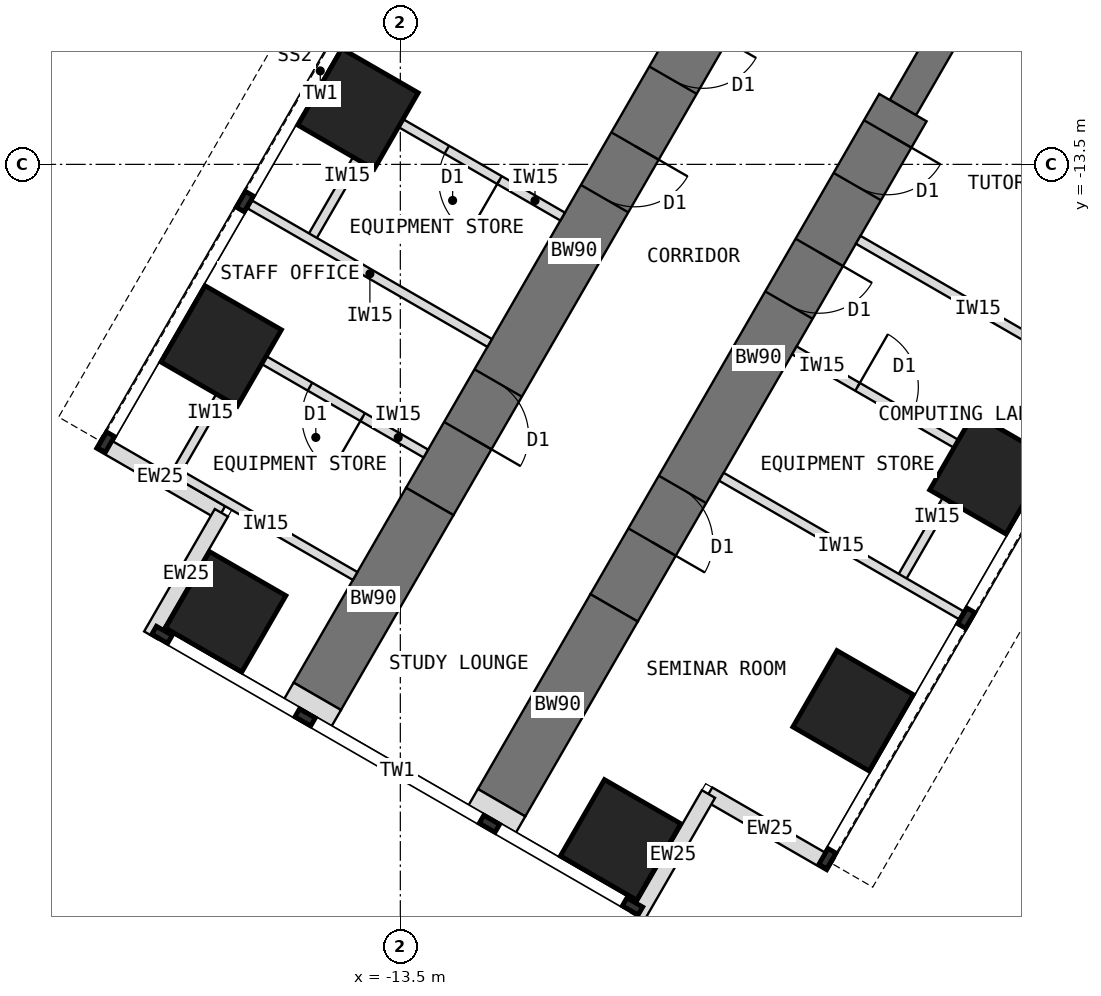
"""IFC4 building model, lengths in metres.
Left out: names, types, materials, properties, quantities, classifications, styles, units other than length and angle.
Written with IfcOpenShell. Run it as: python <this file> out.ifc"""

import sys

from ifc_helpers import new_model, si_unit, direction, frame, frame_2d, origin, origin_2d, place, context, subcontext, project, spatial, rectangle, extrude, element, fill, save


model = new_model("IFC4")
c1 = context("Model", 3, precision=1e-05, world=origin(), true_north=direction((0.0, 1.0)))
c2 = subcontext(c1, "Body", "Model", "MODEL_VIEW")
j1 = project(units=[si_unit("LENGTHUNIT", "METRE"), si_unit("PLANEANGLEUNIT", "RADIAN")], contexts=[c1])
p1 = place(None, origin())
s1 = spatial("IfcSite", under=j1, at=p1, CompositionType="ELEMENT")
p2 = place(p1, origin())
s2 = spatial("IfcBuilding", under=s1, at=p2, CompositionType="ELEMENT")
p3 = place(p2, frame((0.0, 0.0, 60.5)))
s3 = spatial("IfcBuildingStorey", under=s2, at=p3, CompositionType="ELEMENT", Elevation=60.5)
p4 = place(p3, frame((-3.939, -10.322, 0.0), z_axis=(0.0, 0.0, 1.0), x_axis=(0.866011268655, -0.500024481964, 0.0)))
e1 = element("IfcWall", 1, at=p4, inside=s3, PredefinedType="SHEAR", context=c2, shape_type="SweptSolid", body=[
    extrude(rectangle(XDim=4.548, YDim=0.7, at=frame_2d((2.274, 0.0))), origin(), (0.0, 0.0, 1.0), 4.0),
])
p5 = place(p3, frame((-3.939, -10.322, 0.0), z_axis=(0.0, 0.0, 1.0), x_axis=(-0.499918158782, -0.866072649678, 0.0)))
e2 = element("IfcWall", 2, at=p5, inside=s3, PredefinedType="SHEAR", context=c2, shape_type="SweptSolid", body=[
    extrude(rectangle(XDim=2.592, YDim=0.5, at=frame_2d((1.296, 0.0))), origin(), (0.0, 0.0, 1.0), 4.0),
])
p6 = place(p3, frame((-5.234, -12.566, 0.0), z_axis=(0.0, 0.0, 1.0), x_axis=(-0.499997557548, -0.86602681393, 0.0)))
e3 = element("IfcWall", 3, at=p6, inside=s3, PredefinedType="SHEAR", context=c2, shape_type="SweptSolid", body=[
    extrude(rectangle(XDim=9.5, YDim=0.9, at=frame_2d((4.75, 0.0))), origin(), (0.0, 0.0, 1.0), 4.0),
])
p7 = place(p6, frame((0.5, 0.0, 0.0)))
e4 = element("IfcOpeningElement", 4, at=p7, cuts=e3, PredefinedType="OPENING", context=c2, shape_type="SweptSolid", body=[
    extrude(rectangle(XDim=1.0, YDim=2.1, at=frame_2d((0.5, 1.05))), frame((0.0, 0.46, 0.0), z_axis=(0.0, -1.0, 0.0), x_axis=(1.0, 0.0, 0.0)), (0.0, 0.0, 1.0), 0.92),
])
p8 = place(p6, frame((2.75, 0.0, 0.0)))
e5 = element("IfcOpeningElement", 5, at=p8, cuts=e3, PredefinedType="OPENING", context=c2, shape_type="SweptSolid", body=[
    extrude(rectangle(XDim=1.0, YDim=2.1, at=frame_2d((0.5, 1.05))), frame((0.0, 0.46, 0.0), z_axis=(0.0, -1.0, 0.0), x_axis=(1.0, 0.0, 0.0)), (0.0, 0.0, 1.0), 0.92),
])
p9 = place(p6, frame((7.25, 0.0, 0.0)))
e6 = element("IfcOpeningElement", 6, at=p9, cuts=e3, PredefinedType="OPENING", context=c2, shape_type="SweptSolid", body=[
    extrude(rectangle(XDim=1.0, YDim=2.1, at=frame_2d((0.5, 1.05))), frame((0.0, 0.46, 0.0), z_axis=(0.0, -1.0, 0.0), x_axis=(1.0, 0.0, 0.0)), (0.0, 0.0, 1.0), 0.92),
])
p10 = place(p3, frame((-9.984, -20.794, 0.0), z_axis=(0.0, 0.0, 1.0), x_axis=(-0.500042316284, -0.866000971088, 0.0)))
e7 = element("IfcWall", 7, at=p10, inside=s3, PredefinedType="SHEAR", context=c2, shape_type="SweptSolid", body=[
    extrude(rectangle(XDim=3.7, YDim=0.9, at=frame_2d((1.85, 0.0))), origin(), (0.0, 0.0, 1.0), 4.0),
])
p11 = place(p3, frame((-8.266, -10.816, 0.0), z_axis=(0.0, 0.0, 1.0), x_axis=(-0.499997557548, -0.86602681393, 0.0)))
e8 = element("IfcWall", 8, at=p11, inside=s3, PredefinedType="SHEAR", context=c2, shape_type="SweptSolid", body=[
    extrude(rectangle(XDim=9.5, YDim=0.9, at=frame_2d((4.75, 0.0))), origin(), (0.0, 0.0, 1.0), 4.0),
])
p12 = place(p11, frame((0.5, 0.0, 0.0)))
e9 = element("IfcOpeningElement", 9, at=p12, cuts=e8, PredefinedType="OPENING", context=c2, shape_type="SweptSolid", body=[
    extrude(rectangle(XDim=1.0, YDim=2.1, at=frame_2d((0.5, 1.05))), frame((0.0, 0.46, 0.0), z_axis=(0.0, -1.0, 0.0), x_axis=(1.0, 0.0, 0.0)), (0.0, 0.0, 1.0), 0.92),
])
p13 = place(p11, frame((2.75, 0.0, 0.0)))
e10 = element("IfcOpeningElement", 10, at=p13, cuts=e8, PredefinedType="OPENING", context=c2, shape_type="SweptSolid", body=[
    extrude(rectangle(XDim=1.0, YDim=2.1, at=frame_2d((0.5, 1.05))), frame((0.0, 0.46, 0.0), z_axis=(0.0, -1.0, 0.0), x_axis=(1.0, 0.0, 0.0)), (0.0, 0.0, 1.0), 0.92),
])
p14 = place(p11, frame((7.25, 0.0, 0.0)))
e11 = element("IfcOpeningElement", 11, at=p14, cuts=e8, PredefinedType="OPENING", context=c2, shape_type="SweptSolid", body=[
    extrude(rectangle(XDim=1.0, YDim=2.1, at=frame_2d((0.5, 1.05))), frame((0.0, 0.46, 0.0), z_axis=(0.0, -1.0, 0.0), x_axis=(1.0, 0.0, 0.0)), (0.0, 0.0, 1.0), 0.92),
])
p15 = place(p3, frame((-13.016, -19.044, 0.0), z_axis=(0.0, 0.0, 1.0), x_axis=(-0.499992827086, -0.866029545028, 0.0)))
e12 = element("IfcWall", 12, at=p15, inside=s3, PredefinedType="SHEAR", context=c2, shape_type="SweptSolid", body=[
    extrude(rectangle(XDim=3.7, YDim=0.9, at=frame_2d((1.85, 0.0))), origin(), (0.0, 0.0, 1.0), 4.0),
])
for number, where, z_axis, x_axis in (
    (13, (-3.804, -18.588, 0.0), (0.0, 0.0, 1.0), (0.5, 0.866, 0.0)),
    (14, (-14.196, -12.588, 0.0), (0.0, 0.0, 1.0), (0.5, 0.866, 0.0)),
    (15, (-6.054, -22.486, 0.0), (0.0, 0.0, 1.0), (0.5, 0.866, 0.0)),
    (16, (-16.446, -16.486, 0.0), (0.0, 0.0, 1.0), (0.5, 0.866, 0.0)),
    (17, (-9.877, -24.608, 0.0), (0.0, 0.0, 1.0), (0.5, 0.866, 0.0)),
    (18, (-16.373, -20.858, 0.0), (0.0, 0.0, 1.0), (0.5, 0.866, 0.0)),
):
    element("IfcColumn", number, at=place(p3, frame(where, z_axis=z_axis, x_axis=x_axis)), inside=s3, PredefinedType="COLUMN", context=c2, shape_type="SweptSolid", body=[
        extrude(rectangle(XDim=1.45, YDim=1.45, at=origin_2d()), origin(), (0.0, 0.0, 1.0), 4.0),
    ])
for number, where, z_axis, x_axis in (
    (19, (-6.419, -25.017, 0.0), (0.0, 0.0, 1.0), (-0.866, 0.5, 0.0)),
    (20, (-8.432, -23.855, 0.0), (0.0, 0.0, 1.0), (-0.5, -0.866, 0.0)),
    (21, (-18.456, -18.067, 0.0), (0.0, 0.0, 1.0), (0.866, -0.5, 0.0)),
    (22, (-16.443, -19.23, 0.0), (0.0, 0.0, 1.0), (-0.5, -0.866, 0.0)),
):
    element("IfcWall", number, at=place(p3, frame(where, z_axis=z_axis, x_axis=x_axis)), inside=s3, PredefinedType="STANDARD", context=c2, shape_type="SweptSolid", body=[
        extrude(rectangle(XDim=2.325, YDim=0.25, at=frame_2d((1.163, 0.0))), origin(), (0.0, 0.0, 1.0), 3.8),
    ])
for number, where, z_axis, x_axis in (
    (23, (-11.834, -23.998, 0.0), (0.0, 0.0, 1.0), (-0.5, -0.866, 0.0)),
    (24, (-14.865, -22.248, 0.0), (0.0, 0.0, 1.0), (-0.5, -0.866, 0.0)),
):
    element("IfcWall", number, at=place(p3, frame(where, z_axis=z_axis, x_axis=x_axis)), inside=s3, PredefinedType="PARTITIONING", context=c2, shape_type="SweptSolid", body=[
        extrude(rectangle(XDim=0.31, YDim=0.9, at=frame_2d((0.155, 0.0))), origin(), (0.0, 0.0, 1.0), 3.8),
    ])
for number, where, z_axis, x_axis in (
    (25, (-5.97, -14.74, 0.0), (0.0, 0.0, 1.0), (0.866, -0.5, 0.0)),
    (26, (-8.22, -18.637, 0.0), (0.0, 0.0, 1.0), (0.866, -0.5, 0.0)),
):
    element("IfcWall", number, at=place(p3, frame(where, z_axis=z_axis, x_axis=x_axis)), inside=s3, PredefinedType="PARTITIONING", context=c2, shape_type="SweptSolid", body=[
        extrude(rectangle(XDim=4.55, YDim=0.15, at=frame_2d((2.275, 0.0))), origin(), (0.0, 0.0, 1.0), 3.8),
    ])
p16 = place(p3, frame((-4.075, -18.259, 0.0), z_axis=(0.0, 0.0, 1.0), x_axis=(-0.500001309137, -0.866024647952, 0.0)))
e27 = element("IfcWall", 27, at=p16, inside=s3, PredefinedType="PARTITIONING", context=c2, shape_type="SweptSolid", body=[
    extrude(rectangle(XDim=2.4, YDim=0.15, at=frame_2d((1.2, 0.0))), origin(), (0.0, 0.0, 1.0), 3.8),
])
p17 = place(p3, frame((-7.02, -16.559, 0.0), z_axis=(0.0, 0.0, 1.0), x_axis=(0.866038511948, -0.499977295307, 0.0)))
e28 = element("IfcWall", 28, at=p17, inside=s3, PredefinedType="PARTITIONING", context=c2, shape_type="SweptSolid", body=[
    extrude(rectangle(XDim=3.4, YDim=0.15, at=frame_2d((1.7, 0.0))), origin(), (0.0, 0.0, 1.0), 3.8),
])
p18 = place(p17, frame((1.2, 0.0, 0.0)))
e29 = element("IfcOpeningElement", 29, at=p18, cuts=e28, PredefinedType="OPENING", context=c2, shape_type="SweptSolid", body=[
    extrude(rectangle(XDim=1.0, YDim=2.1, at=frame_2d((0.5, 1.05))), frame((0.0, 0.085, 0.0), z_axis=(0.0, -1.0, 0.0), x_axis=(1.0, 0.0, 0.0)), (0.0, 0.0, 1.0), 0.17),
])
p19 = place(p3, frame((-12.03, -16.437, 0.0), z_axis=(0.0, 0.0, 1.0), x_axis=(-0.866035472144, 0.499982560684, 0.0)))
e30 = element("IfcWall", 30, at=p19, inside=s3, PredefinedType="PARTITIONING", context=c2, shape_type="SweptSolid", body=[
    extrude(rectangle(XDim=4.55, YDim=0.15, at=frame_2d((2.275, 0.0))), origin(), (0.0, 0.0, 1.0), 3.8),
])
p20 = place(p3, frame((-13.775, -12.658, 0.0), z_axis=(0.0, 0.0, 1.0), x_axis=(-0.500033551112, -0.866006032174, 0.0)))
e31 = element("IfcWall", 31, at=p20, inside=s3, PredefinedType="PARTITIONING", context=c2, shape_type="SweptSolid", body=[
    extrude(rectangle(XDim=2.4, YDim=0.15, at=frame_2d((1.2, 0.0))), origin(), (0.0, 0.0, 1.0), 3.8),
])
p21 = place(p3, frame((-10.83, -14.359, 0.0), z_axis=(0.0, 0.0, 1.0), x_axis=(-0.865989465428, 0.500062241894, 0.0)))
e32 = element("IfcWall", 32, at=p21, inside=s3, PredefinedType="PARTITIONING", context=c2, shape_type="SweptSolid", body=[
    extrude(rectangle(XDim=3.4, YDim=0.15, at=frame_2d((1.7, 0.0))), origin(), (0.0, 0.0, 1.0), 3.8),
])
p22 = place(p21, frame((1.2, 0.0, 0.0)))
e33 = element("IfcOpeningElement", 33, at=p22, cuts=e32, PredefinedType="OPENING", context=c2, shape_type="SweptSolid", body=[
    extrude(rectangle(XDim=1.0, YDim=2.1, at=frame_2d((0.5, 1.05))), frame((0.0, 0.085, 0.0), z_axis=(0.0, -1.0, 0.0), x_axis=(1.0, 0.0, 0.0)), (0.0, 0.0, 1.0), 0.17),
])
p23 = place(p3, frame((-16.025, -16.556, 0.0), z_axis=(0.0, 0.0, 1.0), x_axis=(-0.500077600433, -0.865980596518, 0.0)))
e34 = element("IfcWall", 34, at=p23, inside=s3, PredefinedType="PARTITIONING", context=c2, shape_type="SweptSolid", body=[
    extrude(rectangle(XDim=2.4, YDim=0.15, at=frame_2d((1.2, 0.0))), origin(), (0.0, 0.0, 1.0), 3.8),
])
p24 = place(p3, frame((-13.08, -18.256, 0.0), z_axis=(0.0, 0.0, 1.0), x_axis=(-0.866020560687, 0.500008388397, 0.0)))
e35 = element("IfcWall", 35, at=p24, inside=s3, PredefinedType="PARTITIONING", context=c2, shape_type="SweptSolid", body=[
    extrude(rectangle(XDim=3.4, YDim=0.15, at=frame_2d((1.7, 0.0))), origin(), (0.0, 0.0, 1.0), 3.8),
])
p25 = place(p24, frame((1.2, 0.0, 0.0)))
e36 = element("IfcOpeningElement", 36, at=p25, cuts=e35, PredefinedType="OPENING", context=c2, shape_type="SweptSolid", body=[
    extrude(rectangle(XDim=1.0, YDim=2.1, at=frame_2d((0.5, 1.05))), frame((0.0, 0.085, 0.0), z_axis=(0.0, -1.0, 0.0), x_axis=(1.0, 0.0, 0.0)), (0.0, 0.0, 1.0), 0.17),
])
p26 = place(p3, frame((-14.243, -20.269, 0.0), z_axis=(0.0, 0.0, 1.0), x_axis=(-0.866007419912, 0.500031147688, 0.0)))
e37 = element("IfcWall", 37, at=p26, inside=s3, PredefinedType="PARTITIONING", context=c2, shape_type="SweptSolid", body=[
    extrude(rectangle(XDim=3.4, YDim=0.15, at=frame_2d((1.7, 0.0))), origin(), (0.0, 0.0, 1.0), 3.8),
])
p27 = place(p18, origin())
e38 = element("IfcDoor", 38, at=p27, inside=s3, OperationType="SINGLE_SWING_LEFT", PredefinedType="DOOR", context=c2, shape_type="SweptSolid", body=[
    extrude(rectangle(XDim=1.0, YDim=2.1, at=frame_2d((0.5, 1.05))), frame((0.0, 0.025, 0.0), z_axis=(0.0, -1.0, 0.0), x_axis=(1.0, 0.0, 0.0)), (0.0, 0.0, 1.0), 0.05),
])
fill(e29, e38)
p28 = place(p22, origin())
e39 = element("IfcDoor", 39, at=p28, inside=s3, OperationType="SINGLE_SWING_LEFT", PredefinedType="DOOR", context=c2, shape_type="SweptSolid", body=[
    extrude(rectangle(XDim=1.0, YDim=2.1, at=frame_2d((0.5, 1.05))), frame((0.0, 0.025, 0.0), z_axis=(0.0, -1.0, 0.0), x_axis=(1.0, 0.0, 0.0)), (0.0, 0.0, 1.0), 0.05),
])
fill(e33, e39)
p29 = place(p25, origin())
e40 = element("IfcDoor", 40, at=p29, inside=s3, OperationType="SINGLE_SWING_LEFT", PredefinedType="DOOR", context=c2, shape_type="SweptSolid", body=[
    extrude(rectangle(XDim=1.0, YDim=2.1, at=frame_2d((0.5, 1.05))), frame((0.0, 0.025, 0.0), z_axis=(0.0, -1.0, 0.0), x_axis=(1.0, 0.0, 0.0)), (0.0, 0.0, 1.0), 0.05),
])
fill(e36, e40)
p30 = place(p7, origin())
e41 = element("IfcDoor", 41, at=p30, inside=s3, OperationType="SINGLE_SWING_LEFT", PredefinedType="DOOR", context=c2, shape_type="SweptSolid", body=[
    extrude(rectangle(XDim=0.92, YDim=2.06, at=frame_2d((0.5, 1.03))), frame((0.0, 0.025, 0.0), z_axis=(0.0, -1.0, 0.0), x_axis=(1.0, 0.0, 0.0)), (0.0, 0.0, 1.0), 0.05),
    extrude(rectangle(XDim=0.04, YDim=2.1, at=frame_2d((0.02, 1.05))), frame((0.0, 0.45, 0.0), z_axis=(0.0, -1.0, 0.0), x_axis=(1.0, 0.0, 0.0)), (0.0, 0.0, 1.0), 0.899),
    extrude(rectangle(XDim=0.04, YDim=2.1, at=frame_2d((0.98, 1.05))), frame((0.0, 0.45, 0.0), z_axis=(0.0, -1.0, 0.0), x_axis=(1.0, 0.0, 0.0)), (0.0, 0.0, 1.0), 0.899),
    extrude(rectangle(XDim=0.92, YDim=0.04, at=frame_2d((0.5, 2.08))), frame((0.0, 0.45, 0.0), z_axis=(0.0, -1.0, 0.0), x_axis=(1.0, 0.0, 0.0)), (0.0, 0.0, 1.0), 0.899),
])
fill(e4, e41)
p31 = place(p8, origin())
e42 = element("IfcDoor", 42, at=p31, inside=s3, OperationType="SINGLE_SWING_LEFT", PredefinedType="DOOR", context=c2, shape_type="SweptSolid", body=[
    extrude(rectangle(XDim=0.92, YDim=2.06, at=frame_2d((0.5, 1.03))), frame((0.0, 0.025, 0.0), z_axis=(0.0, -1.0, 0.0), x_axis=(1.0, 0.0, 0.0)), (0.0, 0.0, 1.0), 0.05),
    extrude(rectangle(XDim=0.04, YDim=2.1, at=frame_2d((0.02, 1.05))), frame((0.0, 0.45, 0.0), z_axis=(0.0, -1.0, 0.0), x_axis=(1.0, 0.0, 0.0)), (0.0, 0.0, 1.0), 0.899),
    extrude(rectangle(XDim=0.04, YDim=2.1, at=frame_2d((0.98, 1.05))), frame((0.0, 0.45, 0.0), z_axis=(0.0, -1.0, 0.0), x_axis=(1.0, 0.0, 0.0)), (0.0, 0.0, 1.0), 0.899),
    extrude(rectangle(XDim=0.92, YDim=0.04, at=frame_2d((0.5, 2.08))), frame((0.0, 0.45, 0.0), z_axis=(0.0, -1.0, 0.0), x_axis=(1.0, 0.0, 0.0)), (0.0, 0.0, 1.0), 0.899),
])
fill(e5, e42)
p32 = place(p9, origin())
e43 = element("IfcDoor", 43, at=p32, inside=s3, OperationType="SINGLE_SWING_RIGHT", PredefinedType="DOOR", context=c2, shape_type="SweptSolid", body=[
    extrude(rectangle(XDim=0.92, YDim=2.06, at=frame_2d((0.5, 1.03))), frame((0.0, 0.025, 0.0), z_axis=(0.0, -1.0, 0.0), x_axis=(1.0, 0.0, 0.0)), (0.0, 0.0, 1.0), 0.05),
    extrude(rectangle(XDim=0.04, YDim=2.1, at=frame_2d((0.02, 1.05))), frame((0.0, 0.45, 0.0), z_axis=(0.0, -1.0, 0.0), x_axis=(1.0, 0.0, 0.0)), (0.0, 0.0, 1.0), 0.899),
    extrude(rectangle(XDim=0.04, YDim=2.1, at=frame_2d((0.98, 1.05))), frame((0.0, 0.45, 0.0), z_axis=(0.0, -1.0, 0.0), x_axis=(1.0, 0.0, 0.0)), (0.0, 0.0, 1.0), 0.899),
    extrude(rectangle(XDim=0.92, YDim=0.04, at=frame_2d((0.5, 2.08))), frame((0.0, 0.45, 0.0), z_axis=(0.0, -1.0, 0.0), x_axis=(1.0, 0.0, 0.0)), (0.0, 0.0, 1.0), 0.899),
])
fill(e6, e43)
p33 = place(p12, origin())
e44 = element("IfcDoor", 44, at=p33, inside=s3, OperationType="SINGLE_SWING_LEFT", PredefinedType="DOOR", context=c2, shape_type="SweptSolid", body=[
    extrude(rectangle(XDim=0.92, YDim=2.06, at=frame_2d((0.5, 1.03))), frame((0.0, 0.025, 0.0), z_axis=(0.0, -1.0, 0.0), x_axis=(1.0, 0.0, 0.0)), (0.0, 0.0, 1.0), 0.05),
    extrude(rectangle(XDim=0.04, YDim=2.1, at=frame_2d((0.02, 1.05))), frame((0.0, 0.45, 0.0), z_axis=(0.0, -1.0, 0.0), x_axis=(1.0, 0.0, 0.0)), (0.0, 0.0, 1.0), 0.899),
    extrude(rectangle(XDim=0.04, YDim=2.1, at=frame_2d((0.98, 1.05))), frame((0.0, 0.45, 0.0), z_axis=(0.0, -1.0, 0.0), x_axis=(1.0, 0.0, 0.0)), (0.0, 0.0, 1.0), 0.899),
    extrude(rectangle(XDim=0.92, YDim=0.04, at=frame_2d((0.5, 2.08))), frame((0.0, 0.45, 0.0), z_axis=(0.0, -1.0, 0.0), x_axis=(1.0, 0.0, 0.0)), (0.0, 0.0, 1.0), 0.899),
])
fill(e9, e44)
p34 = place(p13, origin())
e45 = element("IfcDoor", 45, at=p34, inside=s3, OperationType="SINGLE_SWING_LEFT", PredefinedType="DOOR", context=c2, shape_type="SweptSolid", body=[
    extrude(rectangle(XDim=0.92, YDim=2.06, at=frame_2d((0.5, 1.03))), frame((0.0, 0.025, 0.0), z_axis=(0.0, -1.0, 0.0), x_axis=(1.0, 0.0, 0.0)), (0.0, 0.0, 1.0), 0.05),
    extrude(rectangle(XDim=0.04, YDim=2.1, at=frame_2d((0.02, 1.05))), frame((0.0, 0.45, 0.0), z_axis=(0.0, -1.0, 0.0), x_axis=(1.0, 0.0, 0.0)), (0.0, 0.0, 1.0), 0.899),
    extrude(rectangle(XDim=0.04, YDim=2.1, at=frame_2d((0.98, 1.05))), frame((0.0, 0.45, 0.0), z_axis=(0.0, -1.0, 0.0), x_axis=(1.0, 0.0, 0.0)), (0.0, 0.0, 1.0), 0.899),
    extrude(rectangle(XDim=0.92, YDim=0.04, at=frame_2d((0.5, 2.08))), frame((0.0, 0.45, 0.0), z_axis=(0.0, -1.0, 0.0), x_axis=(1.0, 0.0, 0.0)), (0.0, 0.0, 1.0), 0.899),
])
fill(e10, e45)
p35 = place(p14, origin())
e46 = element("IfcDoor", 46, at=p35, inside=s3, OperationType="SINGLE_SWING_RIGHT", PredefinedType="DOOR", context=c2, shape_type="SweptSolid", body=[
    extrude(rectangle(XDim=0.92, YDim=2.06, at=frame_2d((0.5, 1.03))), frame((0.0, 0.025, 0.0), z_axis=(0.0, -1.0, 0.0), x_axis=(1.0, 0.0, 0.0)), (0.0, 0.0, 1.0), 0.05),
    extrude(rectangle(XDim=0.04, YDim=2.1, at=frame_2d((0.02, 1.05))), frame((0.0, 0.45, 0.0), z_axis=(0.0, -1.0, 0.0), x_axis=(1.0, 0.0, 0.0)), (0.0, 0.0, 1.0), 0.899),
    extrude(rectangle(XDim=0.04, YDim=2.1, at=frame_2d((0.98, 1.05))), frame((0.0, 0.45, 0.0), z_axis=(0.0, -1.0, 0.0), x_axis=(1.0, 0.0, 0.0)), (0.0, 0.0, 1.0), 0.899),
    extrude(rectangle(XDim=0.92, YDim=0.04, at=frame_2d((0.5, 2.08))), frame((0.0, 0.45, 0.0), z_axis=(0.0, -1.0, 0.0), x_axis=(1.0, 0.0, 0.0)), (0.0, 0.0, 1.0), 0.899),
])
fill(e11, e46)
save(model, sys.argv[1])
